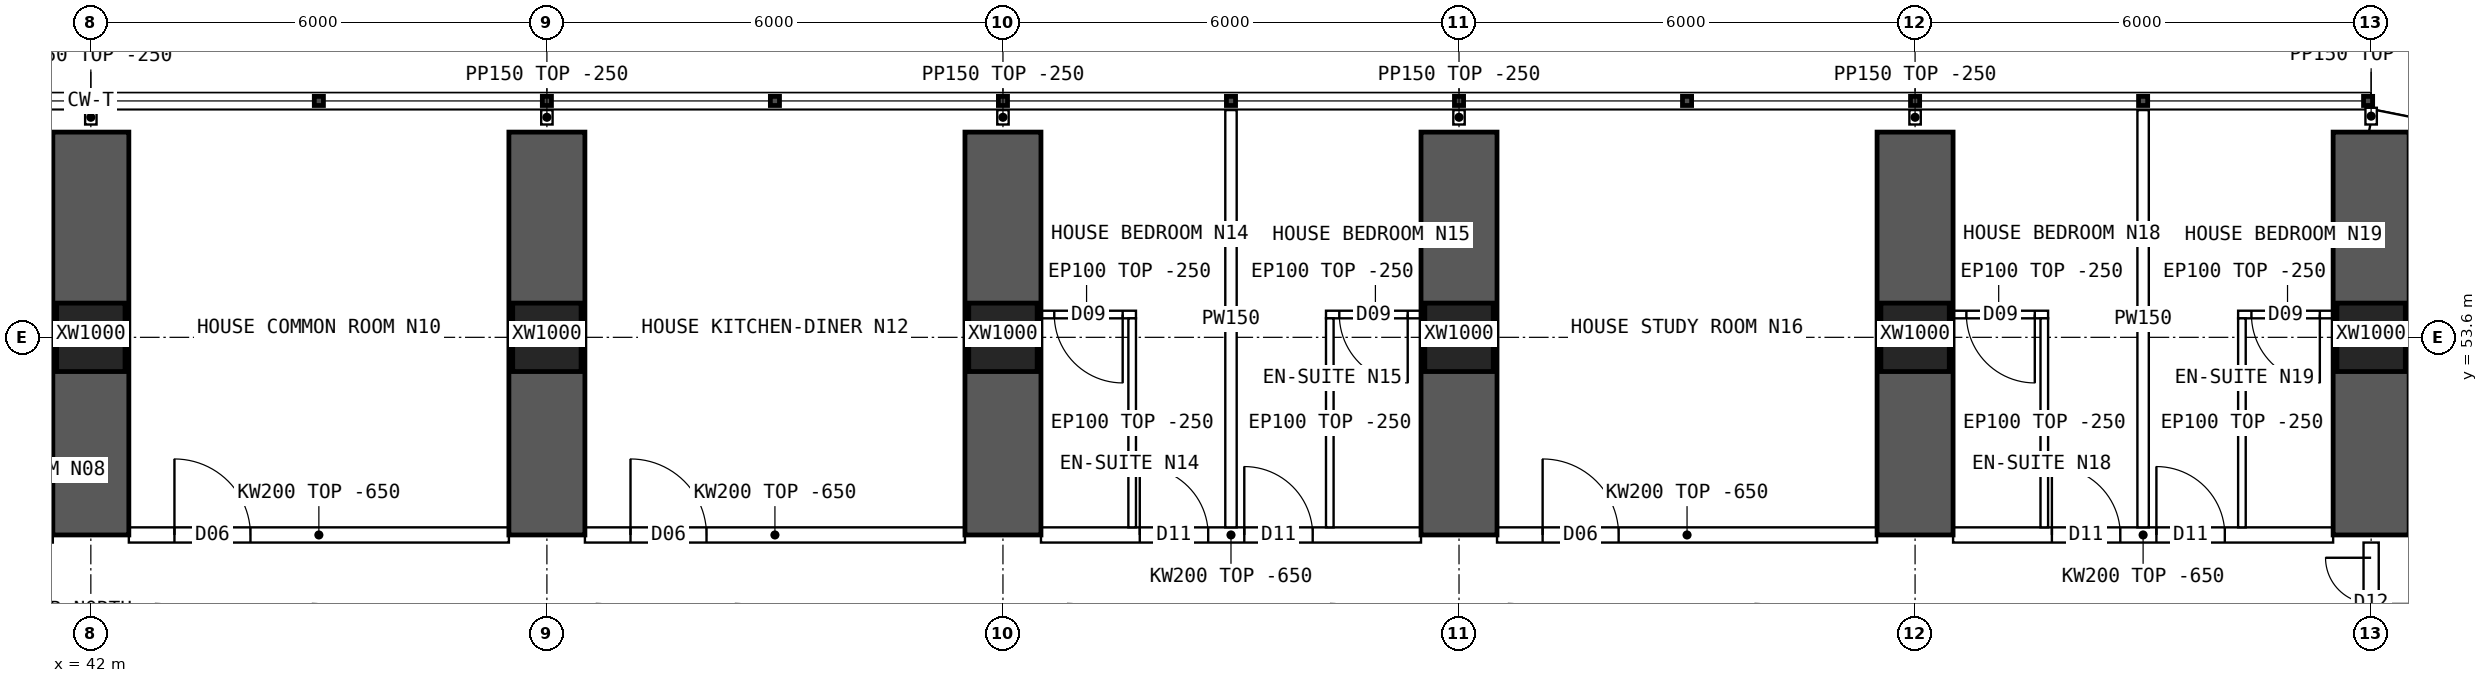
"""IFC4 building model, lengths in metres.
Left out: names, types, materials, properties, quantities, classifications, styles, units other than length and angle.
Written with IfcOpenShell. Run it as: python <this file> out.ifc"""

import sys

from ifc_helpers import new_model, si_unit, direction, frame, frame_2d, origin, origin_2d, place, context, subcontext, project, spatial, polyline, rectangle, hollow_rectangle, outline, extrude, element, fill, save


model = new_model("IFC4")
c1 = context("Model", 3, precision=1e-05, world=origin(), true_north=direction((0.0, 1.0)))
c2 = subcontext(c1, "Body", "Model", "MODEL_VIEW")
j1 = project(units=[si_unit("LENGTHUNIT", "METRE"), si_unit("PLANEANGLEUNIT", "RADIAN")], contexts=[c1])
p1 = place(None, origin())
s1 = spatial("IfcSite", under=j1, at=p1, CompositionType="ELEMENT")
p2 = place(p1, origin())
s2 = spatial("IfcBuilding", under=s1, at=p2, CompositionType="ELEMENT")
p3 = place(p2, frame((0.0, 0.0, 46.45)))
s3 = spatial("IfcBuildingStorey", under=s2, at=p3, CompositionType="ELEMENT", Elevation=46.45)
for number, where, z_axis, x_axis in (
    (1, (42.0, 53.6, 0.0), (0.0, 0.0, 1.0), (1.0, 0.0, 0.0)),
    (2, (48.0, 53.6, 0.0), (0.0, 0.0, 1.0), (1.0, 0.0, 0.0)),
    (3, (54.0, 53.6, 0.0), (0.0, 0.0, 1.0), (1.0, 0.0, 0.0)),
    (4, (60.0, 53.6, 0.0), (0.0, 0.0, 1.0), (1.0, 0.0, 0.0)),
    (5, (66.0, 53.6, 0.0), (0.0, 0.0, 1.0), (1.0, 0.0, 0.0)),
    (6, (72.0, 53.6, 0.0), (0.0, 0.0, 1.0), (1.0, 0.0, 0.0)),
):
    element("IfcColumn", number, at=place(p3, frame(where, z_axis=z_axis, x_axis=x_axis)), inside=s3, PredefinedType="COLUMN", context=c2, shape_type="SweptSolid", body=[
        extrude(hollow_rectangle(XDim=0.9, YDim=0.9, WallThickness=0.09, at=origin_2d()), origin(), (0.0, 0.0, 1.0), 3.75),
    ])
for number, where, z_axis, x_axis in (
    (7, (42.0, 51.0, 0.0), (0.0, 0.0, 1.0), (0.0, 1.0, 0.0)),
    (8, (48.0, 51.0, 0.0), (0.0, 0.0, 1.0), (0.0, 1.0, 0.0)),
    (9, (54.0, 51.0, 0.0), (0.0, 0.0, 1.0), (0.0, 1.0, 0.0)),
    (10, (60.0, 51.0, 0.0), (0.0, 0.0, 1.0), (0.0, 1.0, 0.0)),
    (11, (66.0, 51.0, 0.0), (0.0, 0.0, 1.0), (0.0, 1.0, 0.0)),
    (12, (72.0, 51.0, 0.0), (0.0, 0.0, 1.0), (0.0, 1.0, 0.0)),
):
    element("IfcWall", number, at=place(p3, frame(where, z_axis=z_axis, x_axis=x_axis)), inside=s3, PredefinedType="SHEAR", context=c2, shape_type="SweptSolid", body=[
        extrude(rectangle(XDim=5.3, YDim=1.0, at=frame_2d((2.65, 0.0))), origin(), (0.0, 0.0, 1.0), 3.75),
    ])
p4 = place(p3, frame((75.157, 55.822, 0.0), z_axis=(0.0, 0.0, 1.0), x_axis=(-0.980787251524, 0.195080412259, 0.0)))
e13 = element("IfcWall", 13, at=p4, inside=s3, PredefinedType="SOLIDWALL", context=c2, shape_type="SweptSolid", body=[
    extrude(outline(polyline([(-0.03, -0.15), (3.249, -0.15), (3.189, 0.15), (0.03, 0.15), (-0.03, -0.15)])), origin(), (0.0, 0.0, 1.0), 3.5),
])
p5 = place(p4, frame((0.909, 0.0, 0.9)))
e14 = element("IfcOpeningElement", 14, at=p5, cuts=e13, PredefinedType="OPENING", context=c2, shape_type="SweptSolid", body=[
    extrude(rectangle(XDim=1.4, YDim=1.8, at=frame_2d((0.7, 0.9))), frame((0.0, 0.16, 0.0), z_axis=(0.0, -1.0, 0.0), x_axis=(1.0, 0.0, 0.0)), (0.0, 0.0, 1.0), 0.32),
])
p6 = place(p3, frame((42.5, 51.0, 0.0), z_axis=(0.0, 0.0, 1.0), x_axis=(1.0, 0.0, 0.0)))
e15 = element("IfcWall", 15, at=p6, inside=s3, PredefinedType="SOLIDWALL", context=c2, shape_type="SweptSolid", body=[
    extrude(outline(polyline([(0.0, 0.0), (5.0, 0.0), (5.0, 3.1), (0.0, 3.1), (0.0, 0.0)])), frame((0.0, 0.1, 0.0), z_axis=(0.0, -1.0, 0.0), x_axis=(1.0, 0.0, 0.0)), (0.0, 0.0, 1.0), 0.2),
])
p7 = place(p6, frame((0.6, 0.0, 0.0)))
e16 = element("IfcOpeningElement", 16, at=p7, cuts=e15, PredefinedType="OPENING", context=c2, shape_type="SweptSolid", body=[
    extrude(rectangle(XDim=1.0, YDim=2.1, at=frame_2d((0.5, 1.05))), frame((0.0, 0.11, 0.0), z_axis=(0.0, -1.0, 0.0), x_axis=(1.0, 0.0, 0.0)), (0.0, 0.0, 1.0), 0.22),
])
p8 = place(p3, frame((48.5, 51.0, 0.0), z_axis=(0.0, 0.0, 1.0), x_axis=(1.0, 0.0, 0.0)))
e17 = element("IfcWall", 17, at=p8, inside=s3, PredefinedType="SOLIDWALL", context=c2, shape_type="SweptSolid", body=[
    extrude(outline(polyline([(0.0, 0.0), (5.0, 0.0), (5.0, 3.1), (0.0, 3.1), (0.0, 0.0)])), frame((0.0, 0.1, 0.0), z_axis=(0.0, -1.0, 0.0), x_axis=(1.0, 0.0, 0.0)), (0.0, 0.0, 1.0), 0.2),
])
p9 = place(p8, frame((0.6, 0.0, 0.0)))
e18 = element("IfcOpeningElement", 18, at=p9, cuts=e17, PredefinedType="OPENING", context=c2, shape_type="SweptSolid", body=[
    extrude(rectangle(XDim=1.0, YDim=2.1, at=frame_2d((0.5, 1.05))), frame((0.0, 0.11, 0.0), z_axis=(0.0, -1.0, 0.0), x_axis=(1.0, 0.0, 0.0)), (0.0, 0.0, 1.0), 0.22),
])
p10 = place(p3, frame((54.5, 51.0, 0.0), z_axis=(0.0, 0.0, 1.0), x_axis=(1.0, 0.0, 0.0)))
e19 = element("IfcWall", 19, at=p10, inside=s3, PredefinedType="SOLIDWALL", context=c2, shape_type="SweptSolid", body=[
    extrude(outline(polyline([(0.0, 0.0), (5.0, 0.0), (5.0, 3.1), (0.0, 3.1), (0.0, 0.0)])), frame((0.0, 0.1, 0.0), z_axis=(0.0, -1.0, 0.0), x_axis=(1.0, 0.0, 0.0)), (0.0, 0.0, 1.0), 0.2),
])
p11 = place(p10, frame((1.3, 0.0, 0.0)))
e20 = element("IfcOpeningElement", 20, at=p11, cuts=e19, PredefinedType="OPENING", context=c2, shape_type="SweptSolid", body=[
    extrude(rectangle(XDim=0.9, YDim=2.1, at=frame_2d((0.45, 1.05))), frame((0.0, 0.11, 0.0), z_axis=(0.0, -1.0, 0.0), x_axis=(1.0, 0.0, 0.0)), (0.0, 0.0, 1.0), 0.22),
])
p12 = place(p10, frame((2.675, 0.0, 0.0)))
e21 = element("IfcOpeningElement", 21, at=p12, cuts=e19, PredefinedType="OPENING", context=c2, shape_type="SweptSolid", body=[
    extrude(rectangle(XDim=0.9, YDim=2.1, at=frame_2d((0.45, 1.05))), frame((0.0, 0.11, 0.0), z_axis=(0.0, -1.0, 0.0), x_axis=(1.0, 0.0, 0.0)), (0.0, 0.0, 1.0), 0.22),
])
p13 = place(p3, frame((60.5, 51.0, 0.0), z_axis=(0.0, 0.0, 1.0), x_axis=(1.0, 0.0, 0.0)))
e22 = element("IfcWall", 22, at=p13, inside=s3, PredefinedType="SOLIDWALL", context=c2, shape_type="SweptSolid", body=[
    extrude(outline(polyline([(0.0, 0.0), (5.0, 0.0), (5.0, 3.1), (0.0, 3.1), (0.0, 0.0)])), frame((0.0, 0.1, 0.0), z_axis=(0.0, -1.0, 0.0), x_axis=(1.0, 0.0, 0.0)), (0.0, 0.0, 1.0), 0.2),
])
p14 = place(p13, frame((0.6, 0.0, 0.0)))
e23 = element("IfcOpeningElement", 23, at=p14, cuts=e22, PredefinedType="OPENING", context=c2, shape_type="SweptSolid", body=[
    extrude(rectangle(XDim=1.0, YDim=2.1, at=frame_2d((0.5, 1.05))), frame((0.0, 0.11, 0.0), z_axis=(0.0, -1.0, 0.0), x_axis=(1.0, 0.0, 0.0)), (0.0, 0.0, 1.0), 0.22),
])
p15 = place(p3, frame((66.5, 51.0, 0.0), z_axis=(0.0, 0.0, 1.0), x_axis=(1.0, 0.0, 0.0)))
e24 = element("IfcWall", 24, at=p15, inside=s3, PredefinedType="SOLIDWALL", context=c2, shape_type="SweptSolid", body=[
    extrude(outline(polyline([(0.0, 0.0), (5.0, 0.0), (5.0, 3.1), (0.0, 3.1), (0.0, 0.0)])), frame((0.0, 0.1, 0.0), z_axis=(0.0, -1.0, 0.0), x_axis=(1.0, 0.0, 0.0)), (0.0, 0.0, 1.0), 0.2),
])
p16 = place(p15, frame((1.3, 0.0, 0.0)))
e25 = element("IfcOpeningElement", 25, at=p16, cuts=e24, PredefinedType="OPENING", context=c2, shape_type="SweptSolid", body=[
    extrude(rectangle(XDim=0.9, YDim=2.1, at=frame_2d((0.45, 1.05))), frame((0.0, 0.11, 0.0), z_axis=(0.0, -1.0, 0.0), x_axis=(1.0, 0.0, 0.0)), (0.0, 0.0, 1.0), 0.22),
])
p17 = place(p15, frame((2.675, 0.0, 0.0)))
e26 = element("IfcOpeningElement", 26, at=p17, cuts=e24, PredefinedType="OPENING", context=c2, shape_type="SweptSolid", body=[
    extrude(rectangle(XDim=0.9, YDim=2.1, at=frame_2d((0.45, 1.05))), frame((0.0, 0.11, 0.0), z_axis=(0.0, -1.0, 0.0), x_axis=(1.0, 0.0, 0.0)), (0.0, 0.0, 1.0), 0.22),
])
p18 = place(p3, frame((38.85, 53.7, 0.0), z_axis=(0.0, 0.0, 1.0), x_axis=(1.0, 0.0, 0.0)))
e27 = element("IfcWall", 27, at=p18, inside=s3, PredefinedType="PARTITIONING", context=c2, shape_type="SweptSolid", body=[
    extrude(outline(polyline([(0.0, 0.0), (2.7, 0.0), (2.7, 3.1), (0.0, 3.1), (0.0, 0.0)])), frame((0.0, 0.05, 0.0), z_axis=(0.0, -1.0, 0.0), x_axis=(1.0, 0.0, 0.0)), (0.0, 0.0, 1.0), 0.1),
])
p19 = place(p3, frame((57.0, 56.59, 0.0), z_axis=(0.0, 0.0, 1.0), x_axis=(0.0, -1.0, 0.0)))
e28 = element("IfcWall", 28, at=p19, inside=s3, PredefinedType="PARTITIONING", context=c2, shape_type="SweptSolid", body=[
    extrude(outline(polyline([(0.0, 0.0), (5.49, 0.0), (5.49, 3.1), (5.442, 3.1), (5.44, 3.5), (3.192, 3.5), (3.19, 3.1), (2.792, 3.1), (2.79, 3.5), (0.0, 3.5), (0.0, 0.0)])), frame((0.0, 0.075, 0.0), z_axis=(0.0, -1.0, 0.0), x_axis=(1.0, 0.0, 0.0)), (0.0, 0.0, 1.0), 0.15),
])
p20 = place(p3, frame((54.45, 53.9, 0.0), z_axis=(0.0, 0.0, 1.0), x_axis=(1.0, 0.0, 0.0)))
e29 = element("IfcWall", 29, at=p20, inside=s3, PredefinedType="PARTITIONING", context=c2, shape_type="SweptSolid", body=[
    extrude(rectangle(XDim=1.3, YDim=0.1, at=frame_2d((0.65, 0.0))), origin(), (0.0, 0.0, 1.0), 3.5),
])
p21 = place(p20, frame((0.225, 0.0, 0.0)))
e30 = element("IfcOpeningElement", 30, at=p21, cuts=e29, PredefinedType="OPENING", context=c2, shape_type="SweptSolid", body=[
    extrude(rectangle(XDim=0.9, YDim=2.1, at=frame_2d((0.45, 1.05))), frame((0.0, 0.06, 0.0), z_axis=(0.0, -1.0, 0.0), x_axis=(1.0, 0.0, 0.0)), (0.0, 0.0, 1.0), 0.12),
])
p22 = place(p3, frame((55.7, 53.85, 0.0), z_axis=(0.0, 0.0, 1.0), x_axis=(0.0, -1.0, 0.0)))
e31 = element("IfcWall", 31, at=p22, inside=s3, PredefinedType="PARTITIONING", context=c2, shape_type="SweptSolid", body=[
    extrude(outline(polyline([(0.0, 0.0), (2.75, 0.0), (2.75, 3.1), (2.702, 3.1), (2.7, 3.5), (0.452, 3.5), (0.45, 3.1), (0.0, 3.1), (0.0, 0.0)])), frame((0.0, 0.05, 0.0), z_axis=(0.0, -1.0, 0.0), x_axis=(1.0, 0.0, 0.0)), (0.0, 0.0, 1.0), 0.1),
])
p23 = place(p3, frame((58.25, 53.9, 0.0), z_axis=(0.0, 0.0, 1.0), x_axis=(1.0, 0.0, 0.0)))
e32 = element("IfcWall", 32, at=p23, inside=s3, PredefinedType="PARTITIONING", context=c2, shape_type="SweptSolid", body=[
    extrude(rectangle(XDim=1.3, YDim=0.1, at=frame_2d((0.65, 0.0))), origin(), (0.0, 0.0, 1.0), 3.5),
])
p24 = place(p23, frame((0.175, 0.0, 0.0)))
e33 = element("IfcOpeningElement", 33, at=p24, cuts=e32, PredefinedType="OPENING", context=c2, shape_type="SweptSolid", body=[
    extrude(rectangle(XDim=0.9, YDim=2.1, at=frame_2d((0.45, 1.05))), frame((0.0, 0.06, 0.0), z_axis=(0.0, -1.0, 0.0), x_axis=(1.0, 0.0, 0.0)), (0.0, 0.0, 1.0), 0.12),
])
p25 = place(p3, frame((58.3, 53.85, 0.0), z_axis=(0.0, 0.0, 1.0), x_axis=(0.0, -1.0, 0.0)))
e34 = element("IfcWall", 34, at=p25, inside=s3, PredefinedType="PARTITIONING", context=c2, shape_type="SweptSolid", body=[
    extrude(outline(polyline([(0.0, 0.0), (2.75, 0.0), (2.75, 3.1), (2.702, 3.1), (2.7, 3.5), (0.452, 3.5), (0.45, 3.1), (0.0, 3.1), (0.0, 0.0)])), frame((0.0, 0.05, 0.0), z_axis=(0.0, -1.0, 0.0), x_axis=(1.0, 0.0, 0.0)), (0.0, 0.0, 1.0), 0.1),
])
p26 = place(p3, frame((69.0, 56.59, 0.0), z_axis=(0.0, 0.0, 1.0), x_axis=(0.0, -1.0, 0.0)))
e35 = element("IfcWall", 35, at=p26, inside=s3, PredefinedType="PARTITIONING", context=c2, shape_type="SweptSolid", body=[
    extrude(outline(polyline([(0.0, 0.0), (5.49, 0.0), (5.49, 3.1), (5.442, 3.1), (5.44, 3.5), (3.192, 3.5), (3.19, 3.1), (2.792, 3.1), (2.79, 3.5), (0.0, 3.5), (0.0, 0.0)])), frame((0.0, 0.075, 0.0), z_axis=(0.0, -1.0, 0.0), x_axis=(1.0, 0.0, 0.0)), (0.0, 0.0, 1.0), 0.15),
])
p27 = place(p3, frame((66.45, 53.9, 0.0), z_axis=(0.0, 0.0, 1.0), x_axis=(1.0, 0.0, 0.0)))
e36 = element("IfcWall", 36, at=p27, inside=s3, PredefinedType="PARTITIONING", context=c2, shape_type="SweptSolid", body=[
    extrude(rectangle(XDim=1.3, YDim=0.1, at=frame_2d((0.65, 0.0))), origin(), (0.0, 0.0, 1.0), 3.5),
])
p28 = place(p27, frame((0.225, 0.0, 0.0)))
e37 = element("IfcOpeningElement", 37, at=p28, cuts=e36, PredefinedType="OPENING", context=c2, shape_type="SweptSolid", body=[
    extrude(rectangle(XDim=0.9, YDim=2.1, at=frame_2d((0.45, 1.05))), frame((0.0, 0.06, 0.0), z_axis=(0.0, -1.0, 0.0), x_axis=(1.0, 0.0, 0.0)), (0.0, 0.0, 1.0), 0.12),
])
p29 = place(p3, frame((67.7, 53.85, 0.0), z_axis=(0.0, 0.0, 1.0), x_axis=(0.0, -1.0, 0.0)))
e38 = element("IfcWall", 38, at=p29, inside=s3, PredefinedType="PARTITIONING", context=c2, shape_type="SweptSolid", body=[
    extrude(outline(polyline([(0.0, 0.0), (2.75, 0.0), (2.75, 3.1), (2.702, 3.1), (2.7, 3.5), (0.452, 3.5), (0.45, 3.1), (0.0, 3.1), (0.0, 0.0)])), frame((0.0, 0.05, 0.0), z_axis=(0.0, -1.0, 0.0), x_axis=(1.0, 0.0, 0.0)), (0.0, 0.0, 1.0), 0.1),
])
p30 = place(p3, frame((70.25, 53.9, 0.0), z_axis=(0.0, 0.0, 1.0), x_axis=(1.0, 0.0, 0.0)))
e39 = element("IfcWall", 39, at=p30, inside=s3, PredefinedType="PARTITIONING", context=c2, shape_type="SweptSolid", body=[
    extrude(rectangle(XDim=1.3, YDim=0.1, at=frame_2d((0.65, 0.0))), origin(), (0.0, 0.0, 1.0), 3.5),
])
p31 = place(p30, frame((0.175, 0.0, 0.0)))
e40 = element("IfcOpeningElement", 40, at=p31, cuts=e39, PredefinedType="OPENING", context=c2, shape_type="SweptSolid", body=[
    extrude(rectangle(XDim=0.9, YDim=2.1, at=frame_2d((0.45, 1.05))), frame((0.0, 0.06, 0.0), z_axis=(0.0, -1.0, 0.0), x_axis=(1.0, 0.0, 0.0)), (0.0, 0.0, 1.0), 0.12),
])
p32 = place(p3, frame((70.3, 53.85, 0.0), z_axis=(0.0, 0.0, 1.0), x_axis=(0.0, -1.0, 0.0)))
e41 = element("IfcWall", 41, at=p32, inside=s3, PredefinedType="PARTITIONING", context=c2, shape_type="SweptSolid", body=[
    extrude(outline(polyline([(0.0, 0.0), (2.75, 0.0), (2.75, 3.1), (2.702, 3.1), (2.7, 3.5), (0.452, 3.5), (0.45, 3.1), (0.0, 3.1), (0.0, 0.0)])), frame((0.0, 0.05, 0.0), z_axis=(0.0, -1.0, 0.0), x_axis=(1.0, 0.0, 0.0)), (0.0, 0.0, 1.0), 0.1),
])
p33 = place(p3, frame((72.0, 49.3, 0.0), z_axis=(0.0, 0.0, 1.0), x_axis=(0.0, 1.0, 0.0)))
e42 = element("IfcWall", 42, at=p33, inside=s3, PredefinedType="SOLIDWALL", context=c2, shape_type="SweptSolid", body=[
    extrude(outline(polyline([(0.0, 0.0), (1.6, 0.0), (1.6, 3.05), (0.0, 3.05), (0.0, 0.0)])), frame((0.0, 0.1, 0.0), z_axis=(0.0, -1.0, 0.0), x_axis=(1.0, 0.0, 0.0)), (0.0, 0.0, 1.0), 0.2),
])
p34 = place(p33, frame((0.2, 0.0, 0.0)))
e43 = element("IfcOpeningElement", 43, at=p34, cuts=e42, PredefinedType="OPENING", context=c2, shape_type="SweptSolid", body=[
    extrude(rectangle(XDim=1.2, YDim=2.1, at=frame_2d((0.6, 1.05))), frame((0.0, 0.11, 0.0), z_axis=(0.0, -1.0, 0.0), x_axis=(1.0, 0.0, 0.0)), (0.0, 0.0, 1.0), 0.22),
])
for number, where, z_axis, x_axis in (
    (44, (42.0, 56.4, 0.0), (0.0, 0.0, 1.0), (0.0, 1.0, 0.0)),
    (45, (48.0, 56.4, 0.0), (0.0, 0.0, 1.0), (0.0, 1.0, 0.0)),
    (46, (54.0, 56.4, 0.0), (0.0, 0.0, 1.0), (0.0, 1.0, 0.0)),
    (47, (60.0, 56.4, 0.0), (0.0, 0.0, 1.0), (0.0, 1.0, 0.0)),
    (48, (66.0, 56.4, 0.0), (0.0, 0.0, 1.0), (0.0, 1.0, 0.0)),
):
    element("IfcWall", number, at=place(p3, frame(where, z_axis=z_axis, x_axis=x_axis)), inside=s3, PredefinedType="PARTITIONING", context=c2, shape_type="SweptSolid", body=[
        extrude(rectangle(XDim=0.19, YDim=0.15, at=frame_2d((0.095, 0.0))), origin(), (0.0, 0.0, 1.0), 3.5),
    ])
p35 = place(p3, frame((72.0, 56.4, 0.0), z_axis=(0.0, 0.0, 1.0), x_axis=(0.0, 1.0, 0.0)))
e49 = element("IfcWall", 49, at=p35, inside=s3, PredefinedType="PARTITIONING", context=c2, shape_type="SweptSolid", body=[
    extrude(rectangle(XDim=0.22, YDim=0.15, at=frame_2d((0.11, 0.0))), origin(), (0.0, 0.0, 1.0), 3.5),
])
p36 = place(p7, origin())
e50 = element("IfcDoor", 50, at=p36, inside=s3, OperationType="SINGLE_SWING_LEFT", PredefinedType="DOOR", context=c2, shape_type="SweptSolid", body=[
    extrude(rectangle(XDim=1.0, YDim=2.1, at=frame_2d((0.5, 1.05))), frame((0.0, 0.025, 0.0), z_axis=(0.0, -1.0, 0.0), x_axis=(1.0, 0.0, 0.0)), (0.0, 0.0, 1.0), 0.05),
])
fill(e16, e50)
p37 = place(p9, origin())
e51 = element("IfcDoor", 51, at=p37, inside=s3, OperationType="SINGLE_SWING_LEFT", PredefinedType="DOOR", context=c2, shape_type="SweptSolid", body=[
    extrude(rectangle(XDim=1.0, YDim=2.1, at=frame_2d((0.5, 1.05))), frame((0.0, 0.025, 0.0), z_axis=(0.0, -1.0, 0.0), x_axis=(1.0, 0.0, 0.0)), (0.0, 0.0, 1.0), 0.05),
])
fill(e18, e51)
p38 = place(p21, origin())
e52 = element("IfcDoor", 52, at=p38, inside=s3, OperationType="SINGLE_SWING_RIGHT", PredefinedType="DOOR", context=c2, shape_type="SweptSolid", body=[
    extrude(rectangle(XDim=0.9, YDim=2.1, at=frame_2d((0.45, 1.05))), frame((0.0, 0.025, 0.0), z_axis=(0.0, -1.0, 0.0), x_axis=(1.0, 0.0, 0.0)), (0.0, 0.0, 1.0), 0.05),
])
fill(e30, e52)
p39 = place(p11, origin())
e53 = element("IfcDoor", 53, at=p39, inside=s3, OperationType="SINGLE_SWING_LEFT", PredefinedType="DOOR", context=c2, shape_type="SweptSolid", body=[
    extrude(rectangle(XDim=0.9, YDim=2.1, at=frame_2d((0.45, 1.05))), frame((0.0, 0.025, 0.0), z_axis=(0.0, -1.0, 0.0), x_axis=(1.0, 0.0, 0.0)), (0.0, 0.0, 1.0), 0.05),
])
fill(e20, e53)
p40 = place(p24, origin())
e54 = element("IfcDoor", 54, at=p40, inside=s3, OperationType="SINGLE_SWING_RIGHT", PredefinedType="DOOR", context=c2, shape_type="SweptSolid", body=[
    extrude(rectangle(XDim=0.9, YDim=2.1, at=frame_2d((0.45, 1.05))), frame((0.0, 0.025, 0.0), z_axis=(0.0, -1.0, 0.0), x_axis=(1.0, 0.0, 0.0)), (0.0, 0.0, 1.0), 0.05),
])
fill(e33, e54)
p41 = place(p12, origin())
e55 = element("IfcDoor", 55, at=p41, inside=s3, OperationType="SINGLE_SWING_LEFT", PredefinedType="DOOR", context=c2, shape_type="SweptSolid", body=[
    extrude(rectangle(XDim=0.9, YDim=2.1, at=frame_2d((0.45, 1.05))), frame((0.0, 0.025, 0.0), z_axis=(0.0, -1.0, 0.0), x_axis=(1.0, 0.0, 0.0)), (0.0, 0.0, 1.0), 0.05),
])
fill(e21, e55)
p42 = place(p14, origin())
e56 = element("IfcDoor", 56, at=p42, inside=s3, OperationType="SINGLE_SWING_LEFT", PredefinedType="DOOR", context=c2, shape_type="SweptSolid", body=[
    extrude(rectangle(XDim=1.0, YDim=2.1, at=frame_2d((0.5, 1.05))), frame((0.0, 0.025, 0.0), z_axis=(0.0, -1.0, 0.0), x_axis=(1.0, 0.0, 0.0)), (0.0, 0.0, 1.0), 0.05),
])
fill(e23, e56)
p43 = place(p28, origin())
e57 = element("IfcDoor", 57, at=p43, inside=s3, OperationType="SINGLE_SWING_RIGHT", PredefinedType="DOOR", context=c2, shape_type="SweptSolid", body=[
    extrude(rectangle(XDim=0.9, YDim=2.1, at=frame_2d((0.45, 1.05))), frame((0.0, 0.025, 0.0), z_axis=(0.0, -1.0, 0.0), x_axis=(1.0, 0.0, 0.0)), (0.0, 0.0, 1.0), 0.05),
])
fill(e37, e57)
p44 = place(p16, origin())
e58 = element("IfcDoor", 58, at=p44, inside=s3, OperationType="SINGLE_SWING_LEFT", PredefinedType="DOOR", context=c2, shape_type="SweptSolid", body=[
    extrude(rectangle(XDim=0.9, YDim=2.1, at=frame_2d((0.45, 1.05))), frame((0.0, 0.025, 0.0), z_axis=(0.0, -1.0, 0.0), x_axis=(1.0, 0.0, 0.0)), (0.0, 0.0, 1.0), 0.05),
])
fill(e25, e58)
p45 = place(p31, origin())
e59 = element("IfcDoor", 59, at=p45, inside=s3, OperationType="SINGLE_SWING_RIGHT", PredefinedType="DOOR", context=c2, shape_type="SweptSolid", body=[
    extrude(rectangle(XDim=0.9, YDim=2.1, at=frame_2d((0.45, 1.05))), frame((0.0, 0.025, 0.0), z_axis=(0.0, -1.0, 0.0), x_axis=(1.0, 0.0, 0.0)), (0.0, 0.0, 1.0), 0.05),
])
fill(e40, e59)
p46 = place(p17, origin())
e60 = element("IfcDoor", 60, at=p46, inside=s3, OperationType="SINGLE_SWING_LEFT", PredefinedType="DOOR", context=c2, shape_type="SweptSolid", body=[
    extrude(rectangle(XDim=0.9, YDim=2.1, at=frame_2d((0.45, 1.05))), frame((0.0, 0.025, 0.0), z_axis=(0.0, -1.0, 0.0), x_axis=(1.0, 0.0, 0.0)), (0.0, 0.0, 1.0), 0.05),
])
fill(e26, e60)
p47 = place(p34, origin())
e61 = element("IfcDoor", 61, at=p47, inside=s3, OperationType="DOUBLE_DOOR_SINGLE_SWING", PredefinedType="DOOR", context=c2, shape_type="SweptSolid", body=[
    extrude(rectangle(XDim=1.2, YDim=2.1, at=frame_2d((0.6, 1.05))), frame((0.0, 0.025, 0.0), z_axis=(0.0, -1.0, 0.0), x_axis=(1.0, 0.0, 0.0)), (0.0, 0.0, 1.0), 0.05),
])
fill(e43, e61)
save(model, sys.argv[1])
